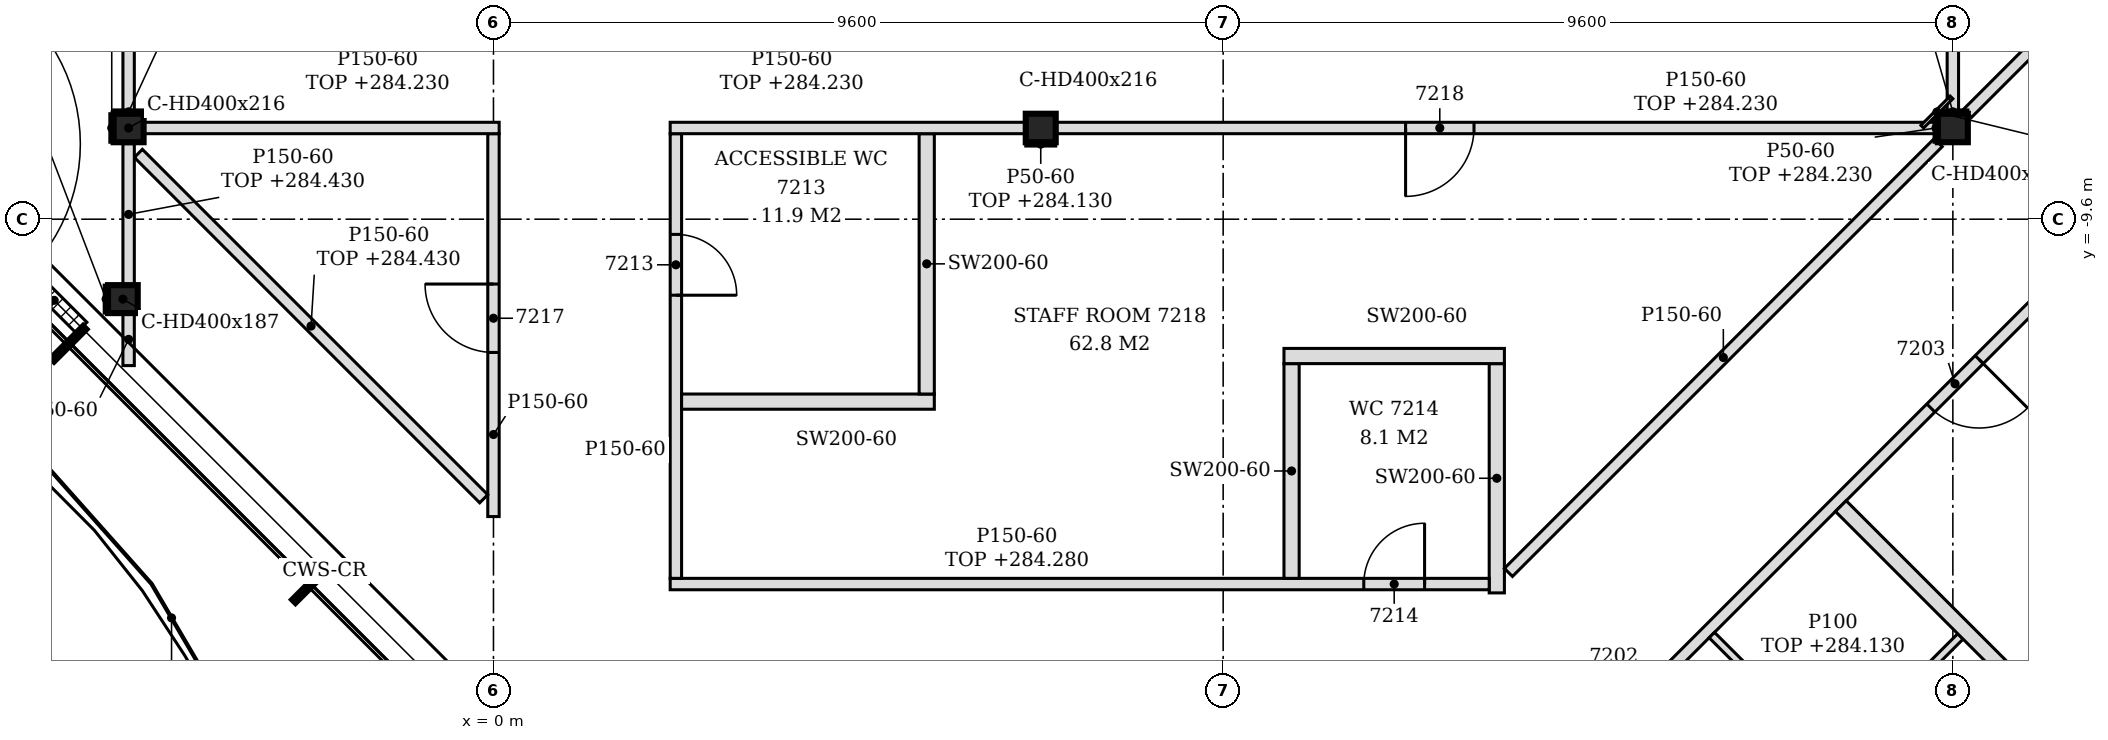
"""IFC4 building model, lengths in metres.
Left out: names, types, materials, properties, quantities, classifications, styles, units other than length and angle.
Written with IfcOpenShell. Run it as: python <this file> out.ifc"""

import sys

from ifc_helpers import new_model, si_unit, direction, frame, frame_2d, origin, origin_2d, place, context, subcontext, project, spatial, polyline, rectangle, i_section, outline, extrude, element, fill, save


model = new_model("IFC4")
c1 = context("Model", 3, precision=1e-05, world=origin(), true_north=direction((0.0, 1.0)))
c2 = subcontext(c1, "Body", "Model", "MODEL_VIEW")
j1 = project(units=[si_unit("LENGTHUNIT", "METRE"), si_unit("PLANEANGLEUNIT", "RADIAN")], contexts=[c1])
p1 = place(None, origin())
s1 = spatial("IfcSite", under=j1, at=p1, CompositionType="ELEMENT")
p2 = place(p1, origin())
s2 = spatial("IfcBuilding", under=s1, at=p2, CompositionType="ELEMENT")
p3 = place(p2, frame((0.0, 0.0, 281.4)))
s3 = spatial("IfcBuildingStorey", under=s2, at=p3, CompositionType="ELEMENT", Elevation=281.4)
p4 = place(p3, frame((-4.876, -10.652, -0.15), z_axis=(0.0, 0.0, 1.0), x_axis=(1.0, 0.0, 0.0)))
e1 = element("IfcColumn", 1, at=p4, inside=s3, PredefinedType="COLUMN", context=c2, shape_type="SweptSolid", body=[
    extrude(i_section(OverallWidth=0.391, OverallDepth=0.368, WebThickness=0.015, FlangeThickness=0.024, FilletRadius=0.015, at=origin_2d()), origin(), (0.0, 0.0, 1.0), 3.6),
])
for number, where, z_axis, x_axis in (
    (2, (-4.8, -8.4, -0.15), (0.0, 0.0, 1.0), (1.0, 0.0, 0.0)),
    (3, (7.2, -8.4, -0.15), (0.0, 0.0, 1.0), (1.0, 0.0, 0.0)),
    (4, (19.2, -8.4, -0.15), (0.0, 0.0, 1.0), (1.0, 0.0, 0.0)),
):
    element("IfcColumn", number, at=place(p3, frame(where, z_axis=z_axis, x_axis=x_axis)), inside=s3, PredefinedType="COLUMN", context=c2, shape_type="SweptSolid", body=[
        extrude(i_section(OverallWidth=0.394, OverallDepth=0.375, WebThickness=0.017, FlangeThickness=0.028, FilletRadius=0.015, at=origin_2d()), origin(), (0.0, 0.0, 1.0), 3.6),
    ])
p5 = place(p3, frame((-8.553, -7.893, 0.0), z_axis=(0.0, 0.0, 1.0), x_axis=(0.707134329907, -0.707079231393, 0.0)))
e5 = element("IfcWall", 5, at=p5, inside=s3, PredefinedType="NOTDEFINED", context=c2, shape_type="SweptSolid", body=[
    extrude(rectangle(XDim=4.431, YDim=0.2, at=frame_2d((2.215, 0.0))), origin(), (0.0, 0.0, 1.0), 3.45),
])
p6 = place(p5, frame((1.015, 0.0, 0.0)))
e6 = element("IfcOpeningElement", 6, at=p6, cuts=e5, PredefinedType="OPENING", context=c2, shape_type="SweptSolid", body=[
    extrude(rectangle(XDim=2.4, YDim=2.4, at=frame_2d((1.2, 1.2))), frame((0.0, 0.11, 0.0), z_axis=(0.0, -1.0, 0.0), x_axis=(1.0, 0.0, 0.0)), (0.0, 0.0, 1.0), 0.22),
])
p7 = place(p3, frame((24.707, -20.355, 0.0), z_axis=(0.0, 0.0, 1.0), x_axis=(-0.707106781187, 0.707106781187, 0.0)))
e7 = element("IfcWall", 7, at=p7, inside=s3, PredefinedType="PARTITIONING", context=c2, shape_type="SweptSolid", body=[
    extrude(rectangle(XDim=9.873, YDim=0.2, at=frame_2d((4.937, 0.0))), origin(), (0.0, 0.0, 1.0), 2.73),
])
p8 = place(p3, frame((17.638, -16.75, 0.0), z_axis=(0.0, 0.0, 1.0), x_axis=(0.707054835785, 0.707158722772, 0.0)))
e8 = element("IfcWall", 8, at=p8, inside=s3, PredefinedType="PARTITIONING", context=c2, shape_type="SweptSolid", body=[
    extrude(rectangle(XDim=2.35, YDim=0.1, at=frame_2d((1.175, 0.0))), origin(), (0.0, 0.0, 1.0), 2.73),
])
p9 = place(p3, frame((14.322, -16.672, 0.0), z_axis=(0.0, 0.0, 1.0), x_axis=(0.707106781187, 0.707106781187, 0.0)))
e9 = element("IfcWall", 9, at=p9, inside=s3, PredefinedType="PARTITIONING", context=c2, shape_type="SweptSolid", body=[
    extrude(rectangle(XDim=23.452, YDim=0.15, at=frame_2d((11.726, 0.0))), origin(), (0.0, 0.0, 1.0), 2.73),
])
p10 = place(p9, frame((0.775, 0.0, 0.0)))
e10 = element("IfcOpeningElement", 10, at=p10, cuts=e9, PredefinedType="OPENING", context=c2, shape_type="SweptSolid", body=[
    extrude(rectangle(XDim=0.9, YDim=2.1, at=frame_2d((0.45, 1.05))), frame((0.0, 0.085, 0.0), z_axis=(0.0, -1.0, 0.0), x_axis=(1.0, 0.0, 0.0)), (0.0, 0.0, 1.0), 0.17),
])
p11 = place(p9, frame((6.489, 0.0, 0.0)))
e11 = element("IfcOpeningElement", 11, at=p11, cuts=e9, PredefinedType="OPENING", context=c2, shape_type="SweptSolid", body=[
    extrude(rectangle(XDim=0.9, YDim=2.1, at=frame_2d((0.45, 1.05))), frame((0.0, 0.085, 0.0), z_axis=(0.0, -1.0, 0.0), x_axis=(1.0, 0.0, 0.0)), (0.0, 0.0, 1.0), 0.17),
])
p12 = place(p9, frame((10.89, 0.0, 0.0)))
e12 = element("IfcOpeningElement", 12, at=p12, cuts=e9, PredefinedType="OPENING", context=c2, shape_type="SweptSolid", body=[
    extrude(rectangle(XDim=0.9, YDim=2.1, at=frame_2d((0.45, 1.05))), frame((0.0, 0.085, 0.0), z_axis=(0.0, -1.0, 0.0), x_axis=(1.0, 0.0, 0.0)), (0.0, 0.0, 1.0), 0.17),
])
p13 = place(p9, frame((14.788, 0.0, 0.0)))
e13 = element("IfcOpeningElement", 13, at=p13, cuts=e9, PredefinedType="OPENING", context=c2, shape_type="SweptSolid", body=[
    extrude(rectangle(XDim=0.9, YDim=2.1, at=frame_2d((0.45, 1.05))), frame((0.0, 0.085, 0.0), z_axis=(0.0, -1.0, 0.0), x_axis=(1.0, 0.0, 0.0)), (0.0, 0.0, 1.0), 0.17),
])
p14 = place(p9, frame((17.689, 0.0, 0.0)))
e14 = element("IfcOpeningElement", 14, at=p14, cuts=e9, PredefinedType="OPENING", context=c2, shape_type="SweptSolid", body=[
    extrude(rectangle(XDim=0.9, YDim=2.1, at=frame_2d((0.45, 1.05))), frame((0.0, 0.085, 0.0), z_axis=(0.0, -1.0, 0.0), x_axis=(1.0, 0.0, 0.0)), (0.0, 0.0, 1.0), 0.17),
])
p15 = place(p3, frame((17.638, -16.68, 0.0), z_axis=(0.0, 0.0, 1.0), x_axis=(-0.707106781187, 0.707106781187, 0.0)))
e15 = element("IfcWall", 15, at=p15, inside=s3, PredefinedType="PARTITIONING", context=c2, shape_type="SweptSolid", body=[
    extrude(rectangle(XDim=2.275, YDim=0.1, at=frame_2d((1.137, 0.0))), origin(), (0.0, 0.0, 1.0), 3.45),
])
p16 = place(p15, frame((0.75, 0.0, 0.0)))
e16 = element("IfcOpeningElement", 16, at=p16, cuts=e15, PredefinedType="OPENING", context=c2, shape_type="SweptSolid", body=[
    extrude(rectangle(XDim=0.8, YDim=2.1, at=frame_2d((0.4, 1.05))), frame((0.0, 0.06, 0.0), z_axis=(0.0, -1.0, 0.0), x_axis=(1.0, 0.0, 0.0)), (0.0, 0.0, 1.0), 0.12),
])
p17 = place(p3, frame((13.2, -14.516, 0.0), z_axis=(0.0, 0.0, 1.0), x_axis=(0.0, 1.0, 0.0)))
e17 = element("IfcWall", 17, at=p17, inside=s3, PredefinedType="PARTITIONING", context=c2, shape_type="SweptSolid", body=[
    extrude(outline(polyline([(0.0, 0.0), (3.016, 0.0), (3.016, 3.45), (0.221, 3.45), (0.219, 2.88), (0.011, 2.88), (0.01, 3.45), (0.0, 3.45), (0.0, 0.0)])), frame((0.0, 0.1, 0.0), z_axis=(0.0, -1.0, 0.0), x_axis=(1.0, 0.0, 0.0)), (0.0, 0.0, 1.0), 0.2),
])
p18 = place(p3, frame((2.325, -14.4, 0.0), z_axis=(0.0, 0.0, 1.0), x_axis=(1.0, 0.0, 0.0)))
e18 = element("IfcWall", 18, at=p18, inside=s3, PredefinedType="PARTITIONING", context=c2, shape_type="SweptSolid", body=[
    extrude(outline(polyline([(0.0, 0.0), (10.775, 0.0), (10.775, 2.88), (5.025, 2.88), (5.023, 2.73), (4.725, 2.73), (4.723, 2.88), (0.0, 2.88), (0.0, 0.0)])), frame((0.0, 0.075, 0.0), z_axis=(0.0, -1.0, 0.0), x_axis=(1.0, 0.0, 0.0)), (0.0, 0.0, 1.0), 0.15),
])
p19 = place(p18, frame((9.125, 0.0, 0.0)))
e19 = element("IfcOpeningElement", 19, at=p19, cuts=e18, PredefinedType="OPENING", context=c2, shape_type="SweptSolid", body=[
    extrude(rectangle(XDim=0.8, YDim=2.1, at=frame_2d((0.4, 1.05))), frame((0.0, 0.085, 0.0), z_axis=(0.0, -1.0, 0.0), x_axis=(1.0, 0.0, 0.0)), (0.0, 0.0, 1.0), 0.17),
])
p20 = place(p3, frame((2.4, -14.325, 0.0), z_axis=(0.0, 0.0, 1.0), x_axis=(0.0, 1.0, 0.0)))
e20 = element("IfcWall", 20, at=p20, inside=s3, PredefinedType="PARTITIONING", context=c2, shape_type="SweptSolid", body=[
    extrude(outline(polyline([(0.0, 0.0), (5.85, 0.0), (5.85, 2.83), (5.775, 2.83), (5.773, 3.45), (0.02, 3.45), (0.018, 2.98), (0.0, 2.98), (0.0, 0.0)])), frame((0.0, 0.075, 0.0), z_axis=(0.0, -1.0, 0.0), x_axis=(1.0, 0.0, 0.0)), (0.0, 0.0, 1.0), 0.15),
])
p21 = place(p20, frame((3.725, 0.0, 0.0)))
e21 = element("IfcOpeningElement", 21, at=p21, cuts=e20, PredefinedType="OPENING", context=c2, shape_type="SweptSolid", body=[
    extrude(rectangle(XDim=0.8, YDim=2.1, at=frame_2d((0.4, 1.05))), frame((0.0, 0.085, 0.0), z_axis=(0.0, -1.0, 0.0), x_axis=(1.0, 0.0, 0.0)), (0.0, 0.0, 1.0), 0.17),
])
p22 = place(p3, frame((10.5, -14.325, 0.0), z_axis=(0.0, 0.0, 1.0), x_axis=(0.0, 1.0, 0.0)))
e22 = element("IfcWall", 22, at=p22, inside=s3, PredefinedType="PARTITIONING", context=c2, shape_type="SweptSolid", body=[
    extrude(outline(polyline([(0.0, 0.0), (2.825, 0.0), (2.825, 3.45), (0.03, 3.45), (0.028, 2.88), (0.0, 2.88), (0.0, 0.0)])), frame((0.0, 0.1, 0.0), z_axis=(0.0, -1.0, 0.0), x_axis=(1.0, 0.0, 0.0)), (0.0, 0.0, 1.0), 0.2),
])
p23 = place(p3, frame((13.353, -14.247, 0.0), z_axis=(0.0, 0.0, 1.0), x_axis=(0.707106781187, 0.707106781187, 0.0)))
e23 = element("IfcWall", 23, at=p23, inside=s3, PredefinedType="PARTITIONING", context=c2, shape_type="SweptSolid", body=[
    extrude(rectangle(XDim=7.997, YDim=0.15, at=frame_2d((3.999, 0.0))), origin(), (0.0, 0.0, 1.0), 3.45),
])
p24 = place(p3, frame((0.0, -13.512, 0.0), z_axis=(0.0, 0.0, 1.0), x_axis=(0.0, 1.0, 0.0)))
e24 = element("IfcWall", 24, at=p24, inside=s3, PredefinedType="PARTITIONING", context=c2, shape_type="SweptSolid", body=[
    extrude(outline(polyline([(0.0, 0.0), (5.037, 0.0), (5.037, 2.83), (4.962, 2.83), (4.96, 3.45), (0.0, 3.45), (0.0, 0.0)])), frame((0.0, 0.075, 0.0), z_axis=(0.0, -1.0, 0.0), x_axis=(1.0, 0.0, 0.0)), (0.0, 0.0, 1.0), 0.15),
])
p25 = place(p24, frame((2.159, 0.0, 0.0)))
e25 = element("IfcOpeningElement", 25, at=p25, cuts=e24, PredefinedType="OPENING", context=c2, shape_type="SweptSolid", body=[
    extrude(rectangle(XDim=0.9, YDim=2.1, at=frame_2d((0.45, 1.05))), frame((0.0, 0.085, 0.0), z_axis=(0.0, -1.0, 0.0), x_axis=(1.0, 0.0, 0.0)), (0.0, 0.0, 1.0), 0.17),
])
p26 = place(p3, frame((-0.128, -13.278, 0.0), z_axis=(0.0, 0.0, 1.0), x_axis=(-0.707106781187, 0.707106781187, 0.0)))
e26 = element("IfcWall", 26, at=p26, inside=s3, PredefinedType="PARTITIONING", context=c2, shape_type="SweptSolid", body=[
    extrude(rectangle(XDim=6.427, YDim=0.15, at=frame_2d((3.213, 0.0))), origin(), (0.0, 0.0, 1.0), 3.03),
])
p27 = place(p3, frame((2.475, -12.0, 0.0), z_axis=(0.0, 0.0, 1.0), x_axis=(1.0, 0.0, 0.0)))
e27 = element("IfcWall", 27, at=p27, inside=s3, PredefinedType="PARTITIONING", context=c2, shape_type="SweptSolid", body=[
    extrude(rectangle(XDim=3.325, YDim=0.2, at=frame_2d((1.663, 0.0))), origin(), (0.0, 0.0, 1.0), 3.45),
])
p28 = place(p3, frame((5.7, -11.9, 0.0), z_axis=(0.0, 0.0, 1.0), x_axis=(0.0, 1.0, 0.0)))
e28 = element("IfcWall", 28, at=p28, inside=s3, PredefinedType="PARTITIONING", context=c2, shape_type="SweptSolid", body=[
    extrude(outline(polyline([(0.0, 0.0), (3.425, 0.0), (3.425, 2.83), (3.35, 2.83), (3.348, 3.45), (0.0, 3.45), (0.0, 0.0)])), frame((0.0, 0.1, 0.0), z_axis=(0.0, -1.0, 0.0), x_axis=(1.0, 0.0, 0.0)), (0.0, 0.0, 1.0), 0.2),
])
p29 = place(p3, frame((-4.8, -11.526, 0.0), z_axis=(0.0, 0.0, 1.0), x_axis=(0.0, 1.0, 0.0)))
e29 = element("IfcWall", 29, at=p29, inside=s3, PredefinedType="PARTITIONING", context=c2, shape_type="SweptSolid", body=[
    extrude(outline(polyline([(0.0, 0.0), (0.691, 0.0), (0.691, 2.63), (0.229, 2.63), (0.227, 3.45), (0.0, 3.45), (0.0, 0.0)])), frame((0.0, 0.075, 0.0), z_axis=(0.0, -1.0, 0.0), x_axis=(1.0, 0.0, 0.0)), (0.0, 0.0, 1.0), 0.15),
])
p30 = place(p3, frame((10.4, -11.4, 0.0), z_axis=(0.0, 0.0, 1.0), x_axis=(1.0, 0.0, 0.0)))
e30 = element("IfcWall", 30, at=p30, inside=s3, PredefinedType="PARTITIONING", context=c2, shape_type="SweptSolid", body=[
    extrude(rectangle(XDim=2.9, YDim=0.2, at=frame_2d((1.45, 0.0))), origin(), (0.0, 0.0, 1.0), 3.45),
])
p31 = place(p3, frame((-4.8, -10.468, 0.0), z_axis=(0.0, 0.0, 1.0), x_axis=(0.0, 1.0, 0.0)))
e31 = element("IfcWall", 31, at=p31, inside=s3, PredefinedType="PARTITIONING", context=c2, shape_type="SweptSolid", body=[
    extrude(outline(polyline([(0.0, 0.0), (1.862, 0.0), (1.862, 3.03), (0.31, 3.03), (0.308, 2.63), (0.066, 2.63), (0.064, 3.03), (0.0, 3.03), (0.0, 0.0)])), frame((0.0, 0.075, 0.0), z_axis=(0.0, -1.0, 0.0), x_axis=(1.0, 0.0, 0.0)), (0.0, 0.0, 1.0), 0.15),
])
for number, where, z_axis, x_axis in (
    (32, (-4.603, -8.4, 0.0), (0.0, 0.0, 1.0), (1.0, 0.0, 0.0)),
    (33, (2.325, -8.4, 0.0), (0.0, 0.0, 1.0), (1.0, 0.0, 0.0)),
):
    element("IfcWall", number, at=place(p3, frame(where, z_axis=z_axis, x_axis=x_axis)), inside=s3, PredefinedType="PARTITIONING", context=c2, shape_type="SweptSolid", body=[
        extrude(rectangle(XDim=4.678, YDim=0.15, at=frame_2d((2.339, 0.0))), origin(), (0.0, 0.0, 1.0), 2.83),
    ])
p32 = place(p3, frame((7.397, -8.4, 0.0), z_axis=(0.0, 0.0, 1.0), x_axis=(1.0, 0.0, 0.0)))
e34 = element("IfcWall", 34, at=p32, inside=s3, PredefinedType="PARTITIONING", context=c2, shape_type="SweptSolid", body=[
    extrude(rectangle(XDim=11.606, YDim=0.15, at=frame_2d((5.803, 0.0))), origin(), (0.0, 0.0, 1.0), 2.83),
])
p33 = place(p32, frame((4.603, 0.0, 0.0)))
e35 = element("IfcOpeningElement", 35, at=p33, cuts=e34, PredefinedType="OPENING", context=c2, shape_type="SweptSolid", body=[
    extrude(rectangle(XDim=0.9, YDim=2.1, at=frame_2d((0.45, 1.05))), frame((0.0, 0.085, 0.0), z_axis=(0.0, -1.0, 0.0), x_axis=(1.0, 0.0, 0.0)), (0.0, 0.0, 1.0), 0.17),
])
p34 = place(p3, frame((-4.8, -8.212, 0.0), z_axis=(0.0, 0.0, 1.0), x_axis=(0.0, 1.0, 0.0)))
e36 = element("IfcWall", 36, at=p34, inside=s3, PredefinedType="PARTITIONING", context=c2, shape_type="SweptSolid", body=[
    extrude(rectangle(XDim=10.425, YDim=0.15, at=frame_2d((5.212, 0.0))), origin(), (0.0, 0.0, 1.0), 2.83),
])
p35 = place(p34, frame((8.113, 0.0, 0.0)))
e37 = element("IfcOpeningElement", 37, at=p35, cuts=e36, PredefinedType="OPENING", context=c2, shape_type="SweptSolid", body=[
    extrude(rectangle(XDim=1.8, YDim=2.1, at=frame_2d((0.9, 1.05))), frame((0.0, 0.085, 0.0), z_axis=(0.0, -1.0, 0.0), x_axis=(1.0, 0.0, 0.0)), (0.0, 0.0, 1.0), 0.17),
])
p36 = place(p3, frame((19.2, -8.212, 0.0), z_axis=(0.0, 0.0, 1.0), x_axis=(0.0, 1.0, 0.0)))
e38 = element("IfcWall", 38, at=p36, inside=s3, PredefinedType="PARTITIONING", context=c2, shape_type="SweptSolid", body=[
    extrude(rectangle(XDim=9.337, YDim=0.15, at=frame_2d((4.669, 0.0))), origin(), (0.0, 0.0, 1.0), 2.83),
])
p37 = place(p3, frame((19.392, -8.208, 0.0), z_axis=(0.0, 0.0, 1.0), x_axis=(0.707106781187, 0.707106781187, 0.0)))
e39 = element("IfcWall", 39, at=p37, inside=s3, PredefinedType="PARTITIONING", context=c2, shape_type="SweptSolid", body=[
    extrude(rectangle(XDim=13.124, YDim=0.15, at=frame_2d((6.562, 0.0))), origin(), (0.0, 0.0, 1.0), 2.88),
])
p38 = place(p37, frame((6.066, 0.0, 0.0)))
e40 = element("IfcOpeningElement", 40, at=p38, cuts=e39, PredefinedType="OPENING", context=c2, shape_type="SweptSolid", body=[
    extrude(rectangle(XDim=0.9, YDim=2.1, at=frame_2d((0.45, 1.05))), frame((0.0, 0.085, 0.0), z_axis=(0.0, -1.0, 0.0), x_axis=(1.0, 0.0, 0.0)), (0.0, 0.0, 1.0), 0.17),
])
p39 = place(p3, frame((18.798, -8.382, 0.0), z_axis=(0.0, 0.0, 1.0), x_axis=(0.707106781187, 0.707106781187, 0.0)))
e41 = element("IfcWall", 41, at=p39, inside=s3, PredefinedType="PARTITIONING", context=c2, shape_type="SweptSolid", body=[
    extrude(rectangle(XDim=0.544, YDim=0.05, at=frame_2d((0.272, 0.0))), origin(), (0.0, 0.0, 1.0), 2.83),
])
p40 = place(p3, frame((-5.096, -10.835, 0.0), z_axis=(0.0, 0.0, 1.0), x_axis=(0.0, 1.0, 0.0)))
e42 = element("IfcWall", 42, at=p40, inside=s3, PredefinedType="PARTITIONING", context=c2, shape_type="SweptSolid", body=[
    extrude(rectangle(XDim=0.368, YDim=0.05, at=frame_2d((0.184, 0.0))), origin(), (0.0, 0.0, 1.0), 2.63),
])
p41 = place(p3, frame((-5.022, -8.587, 0.0), z_axis=(0.0, 0.0, 1.0), x_axis=(0.0, 1.0, 0.0)))
e43 = element("IfcWall", 43, at=p41, inside=s3, PredefinedType="PARTITIONING", context=c2, shape_type="SweptSolid", body=[
    extrude(rectangle(XDim=0.375, YDim=0.05, at=frame_2d((0.188, 0.0))), origin(), (0.0, 0.0, 1.0), 3.45),
])
p42 = place(p3, frame((-4.997, -8.188, 0.0), z_axis=(0.0, 0.0, 1.0), x_axis=(1.0, 0.0, 0.0)))
e44 = element("IfcWall", 44, at=p42, inside=s3, PredefinedType="PARTITIONING", context=c2, shape_type="SweptSolid", body=[
    extrude(rectangle(XDim=0.394, YDim=0.05, at=frame_2d((0.197, 0.0))), origin(), (0.0, 0.0, 1.0), 2.83),
])
p43 = place(p3, frame((7.003, -8.613, 0.0), z_axis=(0.0, 0.0, 1.0), x_axis=(1.0, 0.0, 0.0)))
e45 = element("IfcWall", 45, at=p43, inside=s3, PredefinedType="PARTITIONING", context=c2, shape_type="SweptSolid", body=[
    extrude(rectangle(XDim=0.394, YDim=0.05, at=frame_2d((0.197, 0.0))), origin(), (0.0, 0.0, 1.0), 2.73),
])
p44 = place(p3, frame((19.003, -8.188, 0.0), z_axis=(0.0, 0.0, 1.0), x_axis=(1.0, 0.0, 0.0)))
e46 = element("IfcWall", 46, at=p44, inside=s3, PredefinedType="PARTITIONING", context=c2, shape_type="SweptSolid", body=[
    extrude(rectangle(XDim=0.394, YDim=0.05, at=frame_2d((0.197, 0.0))), origin(), (0.0, 0.0, 1.0), 2.83),
])
p45 = place(p3, frame((18.978, -8.587, 0.0), z_axis=(0.0, 0.0, 1.0), x_axis=(0.0, 1.0, 0.0)))
e47 = element("IfcWall", 47, at=p45, inside=s3, PredefinedType="PARTITIONING", context=c2, shape_type="SweptSolid", body=[
    extrude(rectangle(XDim=0.375, YDim=0.05, at=frame_2d((0.188, 0.0))), origin(), (0.0, 0.0, 1.0), 2.83),
])
p46 = place(p11, frame((0.9, 0.0, 0.0), z_axis=(0.0, 0.0, 1.0), x_axis=(-1.0, 0.0, 0.0)))
e48 = element("IfcDoor", 48, at=p46, inside=s3, OperationType="SINGLE_SWING_LEFT", PredefinedType="DOOR", context=c2, shape_type="SweptSolid", body=[
    extrude(rectangle(XDim=0.9, YDim=2.1, at=frame_2d((0.45, 1.05))), frame((0.0, 0.025, 0.0), z_axis=(0.0, -1.0, 0.0), x_axis=(1.0, 0.0, 0.0)), (0.0, 0.0, 1.0), 0.05),
])
fill(e11, e48)
p47 = place(p21, frame((0.8, 0.0, 0.0), z_axis=(0.0, 0.0, 1.0), x_axis=(-1.0, 0.0, 0.0)))
e49 = element("IfcDoor", 49, at=p47, inside=s3, OperationType="SINGLE_SWING_RIGHT", PredefinedType="DOOR", context=c2, shape_type="SweptSolid", body=[
    extrude(rectangle(XDim=0.8, YDim=2.1, at=frame_2d((0.4, 1.05))), frame((0.0, 0.025, 0.0), z_axis=(0.0, -1.0, 0.0), x_axis=(1.0, 0.0, 0.0)), (0.0, 0.0, 1.0), 0.05),
])
fill(e21, e49)
p48 = place(p19, origin())
e50 = element("IfcDoor", 50, at=p48, inside=s3, OperationType="SINGLE_SWING_RIGHT", PredefinedType="DOOR", context=c2, shape_type="SweptSolid", body=[
    extrude(rectangle(XDim=0.8, YDim=2.1, at=frame_2d((0.4, 1.05))), frame((0.0, 0.025, 0.0), z_axis=(0.0, -1.0, 0.0), x_axis=(1.0, 0.0, 0.0)), (0.0, 0.0, 1.0), 0.05),
])
fill(e19, e50)
p49 = place(p25, origin())
e51 = element("IfcDoor", 51, at=p49, inside=s3, OperationType="SINGLE_SWING_RIGHT", PredefinedType="DOOR", context=c2, shape_type="SweptSolid", body=[
    extrude(rectangle(XDim=0.9, YDim=2.1, at=frame_2d((0.45, 1.05))), frame((0.0, 0.025, 0.0), z_axis=(0.0, -1.0, 0.0), x_axis=(1.0, 0.0, 0.0)), (0.0, 0.0, 1.0), 0.05),
])
fill(e25, e51)
p50 = place(p33, frame((0.9, 0.0, 0.0), z_axis=(0.0, 0.0, 1.0), x_axis=(-1.0, 0.0, 0.0)))
e52 = element("IfcDoor", 52, at=p50, inside=s3, OperationType="SINGLE_SWING_RIGHT", PredefinedType="DOOR", context=c2, shape_type="SweptSolid", body=[
    extrude(rectangle(XDim=0.9, YDim=2.1, at=frame_2d((0.45, 1.05))), frame((0.0, 0.025, 0.0), z_axis=(0.0, -1.0, 0.0), x_axis=(1.0, 0.0, 0.0)), (0.0, 0.0, 1.0), 0.05),
])
fill(e35, e52)
save(model, sys.argv[1])
